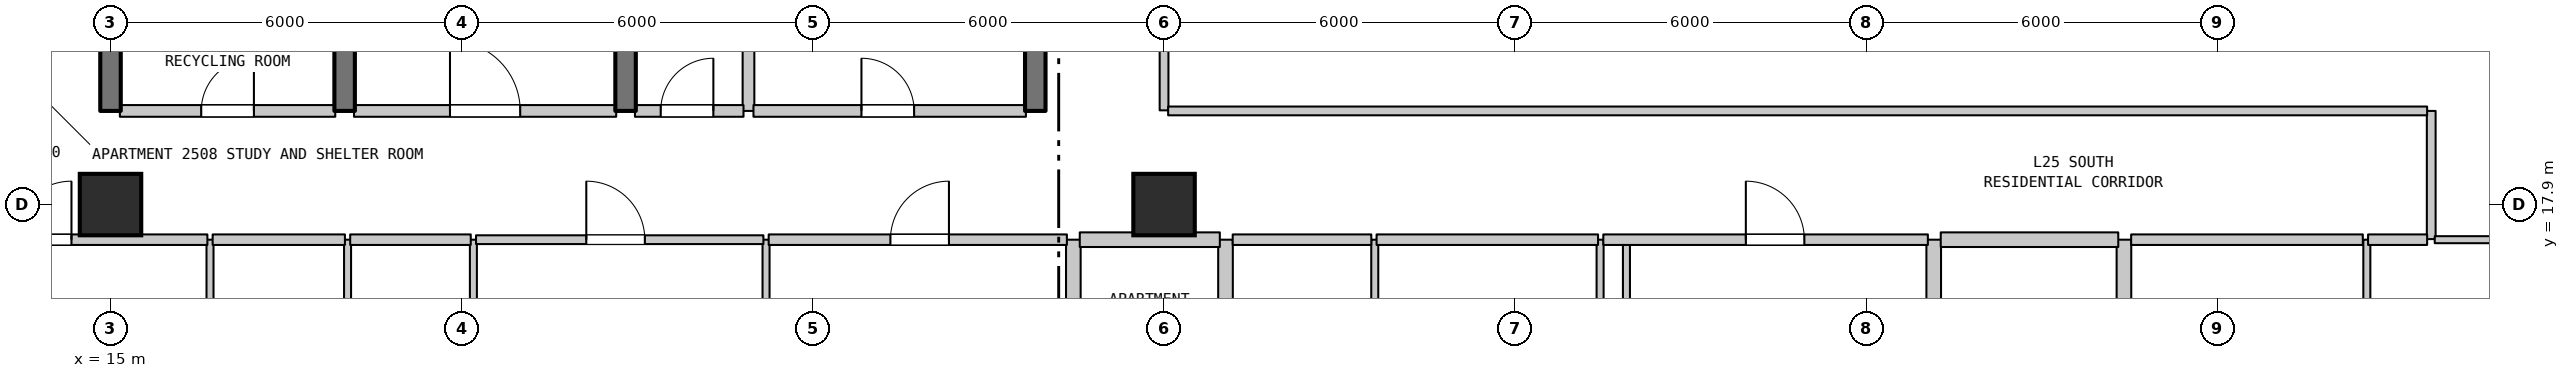
"""IFC4 building model, lengths in metres.
Left out: names, types, materials, properties, quantities, classifications, styles, units other than length and angle.
Written with IfcOpenShell. Run it as: python <this file> out.ifc"""

import sys

from ifc_helpers import new_model, si_unit, direction, frame, frame_2d, origin, origin_2d, place, context, subcontext, project, spatial, rectangle, extrude, element, fill, save


model = new_model("IFC4")
c1 = context("Model", 3, precision=1e-05, world=origin(), true_north=direction((0.0, 1.0)))
c2 = subcontext(c1, "Body", "Model", "MODEL_VIEW")
j1 = project(units=[si_unit("LENGTHUNIT", "METRE"), si_unit("PLANEANGLEUNIT", "RADIAN")], contexts=[c1])
p1 = place(None, origin())
s1 = spatial("IfcSite", under=j1, at=p1, CompositionType="ELEMENT")
p2 = place(p1, origin())
s2 = spatial("IfcBuilding", under=s1, at=p2, CompositionType="ELEMENT")
p3 = place(p2, frame((0.0, 0.0, 105.7)))
s3 = spatial("IfcBuildingStorey", under=s2, at=p3, CompositionType="ELEMENT", Elevation=105.7)
for number, where, z_axis, x_axis in (
    (1, (15.0, 17.9, 0.0), (0.0, 0.0, 1.0), (1.0, 0.0, 0.0)),
    (2, (33.0, 17.9, 0.0), (0.0, 0.0, 1.0), (1.0, 0.0, 0.0)),
):
    element("IfcColumn", number, at=place(p3, frame(where, z_axis=z_axis, x_axis=x_axis)), inside=s3, PredefinedType="COLUMN", context=c2, shape_type="SweptSolid", body=[
        extrude(rectangle(XDim=1.05, YDim=1.05, at=origin_2d()), origin(), (0.0, 0.0, 1.0), 3.7),
    ])
p4 = place(p3, frame((15.0, 19.5, 0.0), z_axis=(0.0, 0.0, 1.0), x_axis=(0.0, 1.0, 0.0)))
e3 = element("IfcWall", 3, at=p4, inside=s3, PredefinedType="SHEAR", context=c2, shape_type="SweptSolid", body=[
    extrude(rectangle(XDim=3.2, YDim=0.35, at=frame_2d((1.6, 0.0))), origin(), (0.0, 0.0, 1.0), 3.385),
])
p5 = place(p3, frame((16.7, 14.1, 0.0), z_axis=(0.0, 0.0, 1.0), x_axis=(0.0, 1.0, 0.0)))
e4 = element("IfcWall", 4, at=p5, inside=s3, PredefinedType="PARTITIONING", context=c2, shape_type="SweptSolid", body=[
    extrude(rectangle(XDim=3.2, YDim=0.12, at=frame_2d((1.6, 0.0))), origin(), (0.0, 0.0, 1.0), 3.385),
])
p6 = place(p5, frame((1.15, 0.0, 0.0)))
e5 = element("IfcOpeningElement", 5, at=p6, cuts=e4, PredefinedType="OPENING", context=c2, shape_type="SweptSolid", body=[
    extrude(rectangle(XDim=0.9, YDim=2.15, at=frame_2d((0.45, 1.075))), frame((0.0, 0.07, 0.0), z_axis=(0.0, -1.0, 0.0), x_axis=(1.0, 0.0, 0.0)), (0.0, 0.0, 1.0), 0.14),
])
p7 = place(p3, frame((19.0, 19.5, 0.0), z_axis=(0.0, 0.0, 1.0), x_axis=(0.0, 1.0, 0.0)))
e6 = element("IfcWall", 6, at=p7, inside=s3, PredefinedType="SHEAR", context=c2, shape_type="SweptSolid", body=[
    extrude(rectangle(XDim=3.2, YDim=0.35, at=frame_2d((1.6, 0.0))), origin(), (0.0, 0.0, 1.0), 3.385),
])
p8 = place(p3, frame((19.05, 14.1, 0.0), z_axis=(0.0, 0.0, 1.0), x_axis=(0.0, 1.0, 0.0)))
e7 = element("IfcWall", 7, at=p8, inside=s3, PredefinedType="PARTITIONING", context=c2, shape_type="SweptSolid", body=[
    extrude(rectangle(XDim=3.2, YDim=0.12, at=frame_2d((1.6, 0.0))), origin(), (0.0, 0.0, 1.0), 3.385),
])
p9 = place(p3, frame((21.2, 2.227, 0.0), z_axis=(0.0, 0.0, 1.0), x_axis=(0.0, 1.0, 0.0)))
e8 = element("IfcWall", 8, at=p9, inside=s3, PredefinedType="PARTITIONING", context=c2, shape_type="SweptSolid", body=[
    extrude(rectangle(XDim=15.073, YDim=0.12, at=frame_2d((7.537, 0.0))), origin(), (0.0, 0.0, 1.0), 3.385),
])
p10 = place(p3, frame((23.8, 19.5, 0.0), z_axis=(0.0, 0.0, 1.0), x_axis=(0.0, 1.0, 0.0)))
e9 = element("IfcWall", 9, at=p10, inside=s3, PredefinedType="SHEAR", context=c2, shape_type="SweptSolid", body=[
    extrude(rectangle(XDim=3.2, YDim=0.35, at=frame_2d((1.6, 0.0))), origin(), (0.0, 0.0, 1.0), 3.385),
])
p11 = place(p3, frame((25.9, 19.5, 0.0), z_axis=(0.0, 0.0, 1.0), x_axis=(0.0, 1.0, 0.0)))
e10 = element("IfcWall", 10, at=p11, inside=s3, PredefinedType="STANDARD", context=c2, shape_type="SweptSolid", body=[
    extrude(rectangle(XDim=3.2, YDim=0.2, at=frame_2d((1.6, 0.0))), origin(), (0.0, 0.0, 1.0), 3.385),
])
p12 = place(p3, frame((26.2, 14.85, 0.0), z_axis=(0.0, 0.0, 1.0), x_axis=(0.0, 1.0, 0.0)))
e11 = element("IfcWall", 11, at=p12, inside=s3, PredefinedType="PARTITIONING", context=c2, shape_type="SweptSolid", body=[
    extrude(rectangle(XDim=2.45, YDim=0.12, at=frame_2d((1.225, 0.0))), origin(), (0.0, 0.0, 1.0), 3.385),
])
p13 = place(p3, frame((30.8, 19.5, 0.0), z_axis=(0.0, 0.0, 1.0), x_axis=(0.0, 1.0, 0.0)))
e12 = element("IfcWall", 12, at=p13, inside=s3, PredefinedType="SHEAR", context=c2, shape_type="SweptSolid", body=[
    extrude(rectangle(XDim=3.2, YDim=0.35, at=frame_2d((1.6, 0.0))), origin(), (0.0, 0.0, 1.0), 3.385),
])
p14 = place(p3, frame((31.45, 11.15, 0.0), z_axis=(0.0, 0.0, 1.0), x_axis=(0.0, 1.0, 0.0)))
e13 = element("IfcWall", 13, at=p14, inside=s3, PredefinedType="STANDARD", context=c2, shape_type="SweptSolid", body=[
    extrude(rectangle(XDim=6.15, YDim=0.25, at=frame_2d((3.075, 0.0))), origin(), (0.0, 0.0, 1.0), 3.385),
])
p15 = place(p14, frame((2.529, 0.0, 0.0)))
e14 = element("IfcOpeningElement", 14, at=p15, cuts=e13, PredefinedType="OPENING", context=c2, shape_type="SweptSolid", body=[
    extrude(rectangle(XDim=0.95, YDim=2.15, at=frame_2d((0.475, 1.075))), frame((0.0, 0.135, 0.0), z_axis=(0.0, -1.0, 0.0), x_axis=(1.0, 0.0, 0.0)), (0.0, 0.0, 1.0), 0.27),
])
p16 = place(p3, frame((33.0, 19.51, 0.0), z_axis=(0.0, 0.0, 1.0), x_axis=(0.0, 1.0, 0.0)))
e15 = element("IfcWall", 15, at=p16, inside=s3, PredefinedType="STANDARD", context=c2, shape_type="SweptSolid", body=[
    extrude(rectangle(XDim=6.18, YDim=0.15, at=frame_2d((3.09, 0.0))), origin(), (0.0, 0.0, 1.0), 2.935),
])
p17 = place(p3, frame((34.05, 11.15, 0.0), z_axis=(0.0, 0.0, 1.0), x_axis=(0.0, 1.0, 0.0)))
e16 = element("IfcWall", 16, at=p17, inside=s3, PredefinedType="STANDARD", context=c2, shape_type="SweptSolid", body=[
    extrude(rectangle(XDim=6.15, YDim=0.25, at=frame_2d((3.075, 0.0))), origin(), (0.0, 0.0, 1.0), 3.385),
])
for number, where, z_axis, x_axis in (
    (17, (36.6, 11.15, 0.0), (0.0, 0.0, 1.0), (0.0, 1.0, 0.0)),
    (18, (40.45, 11.15, 0.0), (0.0, 0.0, 1.0), (0.0, 1.0, 0.0)),
):
    element("IfcWall", number, at=place(p3, frame(where, z_axis=z_axis, x_axis=x_axis)), inside=s3, PredefinedType="PARTITIONING", context=c2, shape_type="SweptSolid", body=[
        extrude(rectangle(XDim=6.15, YDim=0.12, at=frame_2d((3.075, 0.0))), origin(), (0.0, 0.0, 1.0), 3.385),
    ])
p18 = place(p3, frame((40.9, 14.85, 0.0), z_axis=(0.0, 0.0, 1.0), x_axis=(0.0, 1.0, 0.0)))
e19 = element("IfcWall", 19, at=p18, inside=s3, PredefinedType="PARTITIONING", context=c2, shape_type="SweptSolid", body=[
    extrude(rectangle(XDim=2.45, YDim=0.12, at=frame_2d((1.225, 0.0))), origin(), (0.0, 0.0, 1.0), 3.385),
])
for number, where, z_axis, x_axis in (
    (20, (46.15, 11.15, 0.0), (0.0, 0.0, 1.0), (0.0, 1.0, 0.0)),
    (21, (49.4, 11.15, 0.0), (0.0, 0.0, 1.0), (0.0, 1.0, 0.0)),
):
    element("IfcWall", number, at=place(p3, frame(where, z_axis=z_axis, x_axis=x_axis)), inside=s3, PredefinedType="STANDARD", context=c2, shape_type="SweptSolid", body=[
        extrude(rectangle(XDim=6.15, YDim=0.25, at=frame_2d((3.075, 0.0))), origin(), (0.0, 0.0, 1.0), 3.385),
    ])
p19 = place(p3, frame((53.55, 11.15, 0.0), z_axis=(0.0, 0.0, 1.0), x_axis=(0.0, 1.0, 0.0)))
e22 = element("IfcWall", 22, at=p19, inside=s3, PredefinedType="PARTITIONING", context=c2, shape_type="SweptSolid", body=[
    extrude(rectangle(XDim=6.15, YDim=0.12, at=frame_2d((3.075, 0.0))), origin(), (0.0, 0.0, 1.0), 3.385),
])
p20 = place(p3, frame((54.65, 17.31, 0.0), z_axis=(0.0, 0.0, 1.0), x_axis=(0.0, 1.0, 0.0)))
e23 = element("IfcWall", 23, at=p20, inside=s3, PredefinedType="STANDARD", context=c2, shape_type="SweptSolid", body=[
    extrude(rectangle(XDim=2.19, YDim=0.15, at=frame_2d((1.095, 0.0))), origin(), (0.0, 0.0, 1.0), 3.385),
])
p21 = place(p3, frame((12.875, 17.3, 0.0), z_axis=(0.0, 0.0, 1.0), x_axis=(1.0, 0.0, 0.0)))
e24 = element("IfcWall", 24, at=p21, inside=s3, PredefinedType="STANDARD", context=c2, shape_type="SweptSolid", body=[
    extrude(rectangle(XDim=3.78, YDim=0.18, at=frame_2d((1.89, 0.0))), origin(), (0.0, 0.0, 1.0), 3.385),
])
p22 = place(p21, frame((0.458, 0.0, 0.0)))
e25 = element("IfcOpeningElement", 25, at=p22, cuts=e24, PredefinedType="OPENING", context=c2, shape_type="SweptSolid", body=[
    extrude(rectangle(XDim=1.0, YDim=2.15, at=frame_2d((0.5, 1.075))), frame((0.0, 0.1, 0.0), z_axis=(0.0, -1.0, 0.0), x_axis=(1.0, 0.0, 0.0)), (0.0, 0.0, 1.0), 0.2),
])
p23 = place(p3, frame((16.745, 17.3, 0.0), z_axis=(0.0, 0.0, 1.0), x_axis=(1.0, 0.0, 0.0)))
e26 = element("IfcWall", 26, at=p23, inside=s3, PredefinedType="STANDARD", context=c2, shape_type="SweptSolid", body=[
    extrude(rectangle(XDim=2.26, YDim=0.18, at=frame_2d((1.13, 0.0))), origin(), (0.0, 0.0, 1.0), 3.385),
])
p24 = place(p3, frame((19.095, 17.3, 0.0), z_axis=(0.0, 0.0, 1.0), x_axis=(1.0, 0.0, 0.0)))
e27 = element("IfcWall", 27, at=p24, inside=s3, PredefinedType="STANDARD", context=c2, shape_type="SweptSolid", body=[
    extrude(rectangle(XDim=2.06, YDim=0.18, at=frame_2d((1.03, 0.0))), origin(), (0.0, 0.0, 1.0), 3.385),
])
p25 = place(p3, frame((21.245, 17.3, 0.0), z_axis=(0.0, 0.0, 1.0), x_axis=(1.0, 0.0, 0.0)))
e28 = element("IfcWall", 28, at=p25, inside=s3, PredefinedType="STANDARD", context=c2, shape_type="SweptSolid", body=[
    extrude(rectangle(XDim=4.91, YDim=0.15, at=frame_2d((2.455, 0.0))), origin(), (0.0, 0.0, 1.0), 3.385),
])
p26 = place(p25, frame((1.884, 0.0, 0.0)))
e29 = element("IfcOpeningElement", 29, at=p26, cuts=e28, PredefinedType="OPENING", context=c2, shape_type="SweptSolid", body=[
    extrude(rectangle(XDim=1.0, YDim=2.15, at=frame_2d((0.5, 1.075))), frame((0.0, 0.085, 0.0), z_axis=(0.0, -1.0, 0.0), x_axis=(1.0, 0.0, 0.0)), (0.0, 0.0, 1.0), 0.17),
])
p27 = place(p3, frame((26.245, 17.3, 0.0), z_axis=(0.0, 0.0, 1.0), x_axis=(1.0, 0.0, 0.0)))
e30 = element("IfcWall", 30, at=p27, inside=s3, PredefinedType="STANDARD", context=c2, shape_type="SweptSolid", body=[
    extrude(rectangle(XDim=5.095, YDim=0.18, at=frame_2d((2.547, 0.0))), origin(), (0.0, 0.0, 1.0), 3.385),
])
p28 = place(p27, frame((2.08, 0.0, 0.0)))
e31 = element("IfcOpeningElement", 31, at=p28, cuts=e30, PredefinedType="OPENING", context=c2, shape_type="SweptSolid", body=[
    extrude(rectangle(XDim=1.0, YDim=2.15, at=frame_2d((0.5, 1.075))), frame((0.0, 0.1, 0.0), z_axis=(0.0, -1.0, 0.0), x_axis=(1.0, 0.0, 0.0)), (0.0, 0.0, 1.0), 0.2),
])
p29 = place(p3, frame((31.56, 17.3, 0.0), z_axis=(0.0, 0.0, 1.0), x_axis=(1.0, 0.0, 0.0)))
e32 = element("IfcWall", 32, at=p29, inside=s3, PredefinedType="STANDARD", context=c2, shape_type="SweptSolid", body=[
    extrude(rectangle(XDim=2.393, YDim=0.25, at=frame_2d((1.196, 0.0))), origin(), (0.0, 0.0, 1.0), 3.385),
])
p30 = place(p3, frame((34.173, 17.3, 0.0), z_axis=(0.0, 0.0, 1.0), x_axis=(1.0, 0.0, 0.0)))
e33 = element("IfcWall", 33, at=p30, inside=s3, PredefinedType="STANDARD", context=c2, shape_type="SweptSolid", body=[
    extrude(rectangle(XDim=2.368, YDim=0.18, at=frame_2d((1.184, 0.0))), origin(), (0.0, 0.0, 1.0), 3.385),
])
p31 = place(p3, frame((36.631, 17.3, 0.0), z_axis=(0.0, 0.0, 1.0), x_axis=(1.0, 0.0, 0.0)))
e34 = element("IfcWall", 34, at=p31, inside=s3, PredefinedType="STANDARD", context=c2, shape_type="SweptSolid", body=[
    extrude(rectangle(XDim=3.784, YDim=0.18, at=frame_2d((1.892, 0.0))), origin(), (0.0, 0.0, 1.0), 3.385),
])
p32 = place(p3, frame((40.505, 17.3, 0.0), z_axis=(0.0, 0.0, 1.0), x_axis=(1.0, 0.0, 0.0)))
e35 = element("IfcWall", 35, at=p32, inside=s3, PredefinedType="STANDARD", context=c2, shape_type="SweptSolid", body=[
    extrude(rectangle(XDim=5.545, YDim=0.18, at=frame_2d((2.772, 0.0))), origin(), (0.0, 0.0, 1.0), 3.385),
])
p33 = place(p32, frame((2.435, 0.0, 0.0)))
e36 = element("IfcOpeningElement", 36, at=p33, cuts=e35, PredefinedType="OPENING", context=c2, shape_type="SweptSolid", body=[
    extrude(rectangle(XDim=1.0, YDim=2.15, at=frame_2d((0.5, 1.075))), frame((0.0, 0.1, 0.0), z_axis=(0.0, -1.0, 0.0), x_axis=(1.0, 0.0, 0.0)), (0.0, 0.0, 1.0), 0.2),
])
p34 = place(p3, frame((46.27, 17.3, 0.0), z_axis=(0.0, 0.0, 1.0), x_axis=(1.0, 0.0, 0.0)))
e37 = element("IfcWall", 37, at=p34, inside=s3, PredefinedType="STANDARD", context=c2, shape_type="SweptSolid", body=[
    extrude(rectangle(XDim=3.033, YDim=0.25, at=frame_2d((1.517, 0.0))), origin(), (0.0, 0.0, 1.0), 3.385),
])
p35 = place(p3, frame((49.523, 17.3, 0.0), z_axis=(0.0, 0.0, 1.0), x_axis=(1.0, 0.0, 0.0)))
e38 = element("IfcWall", 38, at=p35, inside=s3, PredefinedType="STANDARD", context=c2, shape_type="SweptSolid", body=[
    extrude(rectangle(XDim=3.958, YDim=0.18, at=frame_2d((1.979, 0.0))), origin(), (0.0, 0.0, 1.0), 3.385),
])
p36 = place(p3, frame((53.571, 17.3, 0.0), z_axis=(0.0, 0.0, 1.0), x_axis=(1.0, 0.0, 0.0)))
e39 = element("IfcWall", 39, at=p36, inside=s3, PredefinedType="STANDARD", context=c2, shape_type="SweptSolid", body=[
    extrude(rectangle(XDim=1.009, YDim=0.18, at=frame_2d((0.504, 0.0))), origin(), (0.0, 0.0, 1.0), 3.385),
])
p37 = place(p3, frame((54.71, 17.3, 0.0), z_axis=(0.0, 0.0, 1.0), x_axis=(1.0, 0.0, 0.0)))
e40 = element("IfcWall", 40, at=p37, inside=s3, PredefinedType="PARTITIONING", context=c2, shape_type="SweptSolid", body=[
    extrude(rectangle(XDim=1.635, YDim=0.12, at=frame_2d((0.817, 0.0))), origin(), (0.0, 0.0, 1.0), 3.385),
])
p38 = place(p3, frame((15.16, 19.5, 0.0), z_axis=(0.0, 0.0, 1.0), x_axis=(1.0, 0.0, 0.0)))
e41 = element("IfcWall", 41, at=p38, inside=s3, PredefinedType="STANDARD", context=c2, shape_type="SweptSolid", body=[
    extrude(rectangle(XDim=3.68, YDim=0.2, at=frame_2d((1.84, 0.0))), origin(), (0.0, 0.0, 1.0), 3.385),
])
p39 = place(p38, frame((1.39, 0.0, 0.0)))
e42 = element("IfcOpeningElement", 42, at=p39, cuts=e41, PredefinedType="OPENING", context=c2, shape_type="SweptSolid", body=[
    extrude(rectangle(XDim=0.9, YDim=2.15, at=frame_2d((0.45, 1.075))), frame((0.0, 0.11, 0.0), z_axis=(0.0, -1.0, 0.0), x_axis=(1.0, 0.0, 0.0)), (0.0, 0.0, 1.0), 0.22),
])
p40 = place(p3, frame((19.16, 19.5, 0.0), z_axis=(0.0, 0.0, 1.0), x_axis=(1.0, 0.0, 0.0)))
e43 = element("IfcWall", 43, at=p40, inside=s3, PredefinedType="STANDARD", context=c2, shape_type="SweptSolid", body=[
    extrude(rectangle(XDim=4.48, YDim=0.2, at=frame_2d((2.24, 0.0))), origin(), (0.0, 0.0, 1.0), 3.385),
])
p41 = place(p40, frame((1.64, 0.0, 0.0)))
e44 = element("IfcOpeningElement", 44, at=p41, cuts=e43, PredefinedType="OPENING", context=c2, shape_type="SweptSolid", body=[
    extrude(rectangle(XDim=1.2, YDim=2.2, at=frame_2d((0.6, 1.1))), frame((0.0, 0.11, 0.0), z_axis=(0.0, -1.0, 0.0), x_axis=(1.0, 0.0, 0.0)), (0.0, 0.0, 1.0), 0.22),
])
p42 = place(p3, frame((23.96, 19.5, 0.0), z_axis=(0.0, 0.0, 1.0), x_axis=(1.0, 0.0, 0.0)))
e45 = element("IfcWall", 45, at=p42, inside=s3, PredefinedType="STANDARD", context=c2, shape_type="SweptSolid", body=[
    extrude(rectangle(XDim=1.855, YDim=0.2, at=frame_2d((0.927, 0.0))), origin(), (0.0, 0.0, 1.0), 3.385),
])
p43 = place(p42, frame((0.44, 0.0, 0.0)))
e46 = element("IfcOpeningElement", 46, at=p43, cuts=e45, PredefinedType="OPENING", context=c2, shape_type="SweptSolid", body=[
    extrude(rectangle(XDim=0.9, YDim=2.15, at=frame_2d((0.45, 1.075))), frame((0.0, 0.11, 0.0), z_axis=(0.0, -1.0, 0.0), x_axis=(1.0, 0.0, 0.0)), (0.0, 0.0, 1.0), 0.22),
])
p44 = place(p3, frame((25.985, 19.5, 0.0), z_axis=(0.0, 0.0, 1.0), x_axis=(1.0, 0.0, 0.0)))
e47 = element("IfcWall", 47, at=p44, inside=s3, PredefinedType="STANDARD", context=c2, shape_type="SweptSolid", body=[
    extrude(rectangle(XDim=4.655, YDim=0.2, at=frame_2d((2.327, 0.0))), origin(), (0.0, 0.0, 1.0), 3.385),
])
p45 = place(p44, frame((1.845, 0.0, 0.0)))
e48 = element("IfcOpeningElement", 48, at=p45, cuts=e47, PredefinedType="OPENING", context=c2, shape_type="SweptSolid", body=[
    extrude(rectangle(XDim=0.9, YDim=2.15, at=frame_2d((0.45, 1.075))), frame((0.0, 0.11, 0.0), z_axis=(0.0, -1.0, 0.0), x_axis=(1.0, 0.0, 0.0)), (0.0, 0.0, 1.0), 0.22),
])
p46 = place(p3, frame((33.07, 19.5, 0.0), z_axis=(0.0, 0.0, 1.0), x_axis=(1.0, 0.0, 0.0)))
e49 = element("IfcWall", 49, at=p46, inside=s3, PredefinedType="STANDARD", context=c2, shape_type="SweptSolid", body=[
    extrude(rectangle(XDim=21.51, YDim=0.15, at=frame_2d((10.755, 0.0))), origin(), (0.0, 0.0, 1.0), 3.385),
])
p47 = place(p22, origin())
e50 = element("IfcDoor", 50, at=p47, inside=s3, OperationType="SINGLE_SWING_RIGHT", PredefinedType="DOOR", context=c2, shape_type="SweptSolid", body=[
    extrude(rectangle(XDim=1.0, YDim=2.15, at=frame_2d((0.5, 1.075))), frame((0.0, 0.025, 0.0), z_axis=(0.0, -1.0, 0.0), x_axis=(1.0, 0.0, 0.0)), (0.0, 0.0, 1.0), 0.05),
])
fill(e25, e50)
p48 = place(p26, origin())
e51 = element("IfcDoor", 51, at=p48, inside=s3, OperationType="SINGLE_SWING_LEFT", PredefinedType="DOOR", context=c2, shape_type="SweptSolid", body=[
    extrude(rectangle(XDim=1.0, YDim=2.15, at=frame_2d((0.5, 1.075))), frame((0.0, 0.025, 0.0), z_axis=(0.0, -1.0, 0.0), x_axis=(1.0, 0.0, 0.0)), (0.0, 0.0, 1.0), 0.05),
])
fill(e29, e51)
p49 = place(p28, origin())
e52 = element("IfcDoor", 52, at=p49, inside=s3, OperationType="SINGLE_SWING_RIGHT", PredefinedType="DOOR", context=c2, shape_type="SweptSolid", body=[
    extrude(rectangle(XDim=1.0, YDim=2.15, at=frame_2d((0.5, 1.075))), frame((0.0, 0.025, 0.0), z_axis=(0.0, -1.0, 0.0), x_axis=(1.0, 0.0, 0.0)), (0.0, 0.0, 1.0), 0.05),
])
fill(e31, e52)
p50 = place(p33, origin())
e53 = element("IfcDoor", 53, at=p50, inside=s3, OperationType="SINGLE_SWING_LEFT", PredefinedType="DOOR", context=c2, shape_type="SweptSolid", body=[
    extrude(rectangle(XDim=1.0, YDim=2.15, at=frame_2d((0.5, 1.075))), frame((0.0, 0.025, 0.0), z_axis=(0.0, -1.0, 0.0), x_axis=(1.0, 0.0, 0.0)), (0.0, 0.0, 1.0), 0.05),
])
fill(e36, e53)
p51 = place(p39, origin())
e54 = element("IfcDoor", 54, at=p51, inside=s3, OperationType="SINGLE_SWING_RIGHT", PredefinedType="DOOR", context=c2, shape_type="SweptSolid", body=[
    extrude(rectangle(XDim=0.9, YDim=2.15, at=frame_2d((0.45, 1.075))), frame((0.0, 0.025, 0.0), z_axis=(0.0, -1.0, 0.0), x_axis=(1.0, 0.0, 0.0)), (0.0, 0.0, 1.0), 0.05),
])
fill(e42, e54)
p52 = place(p41, origin())
e55 = element("IfcDoor", 55, at=p52, inside=s3, OperationType="SINGLE_SWING_LEFT", PredefinedType="DOOR", context=c2, shape_type="SweptSolid", body=[
    extrude(rectangle(XDim=1.2, YDim=2.2, at=frame_2d((0.6, 1.1))), frame((0.0, 0.025, 0.0), z_axis=(0.0, -1.0, 0.0), x_axis=(1.0, 0.0, 0.0)), (0.0, 0.0, 1.0), 0.05),
])
fill(e44, e55)
p53 = place(p43, origin())
e56 = element("IfcDoor", 56, at=p53, inside=s3, OperationType="SINGLE_SWING_RIGHT", PredefinedType="DOOR", context=c2, shape_type="SweptSolid", body=[
    extrude(rectangle(XDim=0.9, YDim=2.15, at=frame_2d((0.45, 1.075))), frame((0.0, 0.025, 0.0), z_axis=(0.0, -1.0, 0.0), x_axis=(1.0, 0.0, 0.0)), (0.0, 0.0, 1.0), 0.05),
])
fill(e46, e56)
p54 = place(p45, origin())
e57 = element("IfcDoor", 57, at=p54, inside=s3, OperationType="SINGLE_SWING_LEFT", PredefinedType="DOOR", context=c2, shape_type="SweptSolid", body=[
    extrude(rectangle(XDim=0.9, YDim=2.15, at=frame_2d((0.45, 1.075))), frame((0.0, 0.025, 0.0), z_axis=(0.0, -1.0, 0.0), x_axis=(1.0, 0.0, 0.0)), (0.0, 0.0, 1.0), 0.05),
])
fill(e48, e57)
save(model, sys.argv[1])
